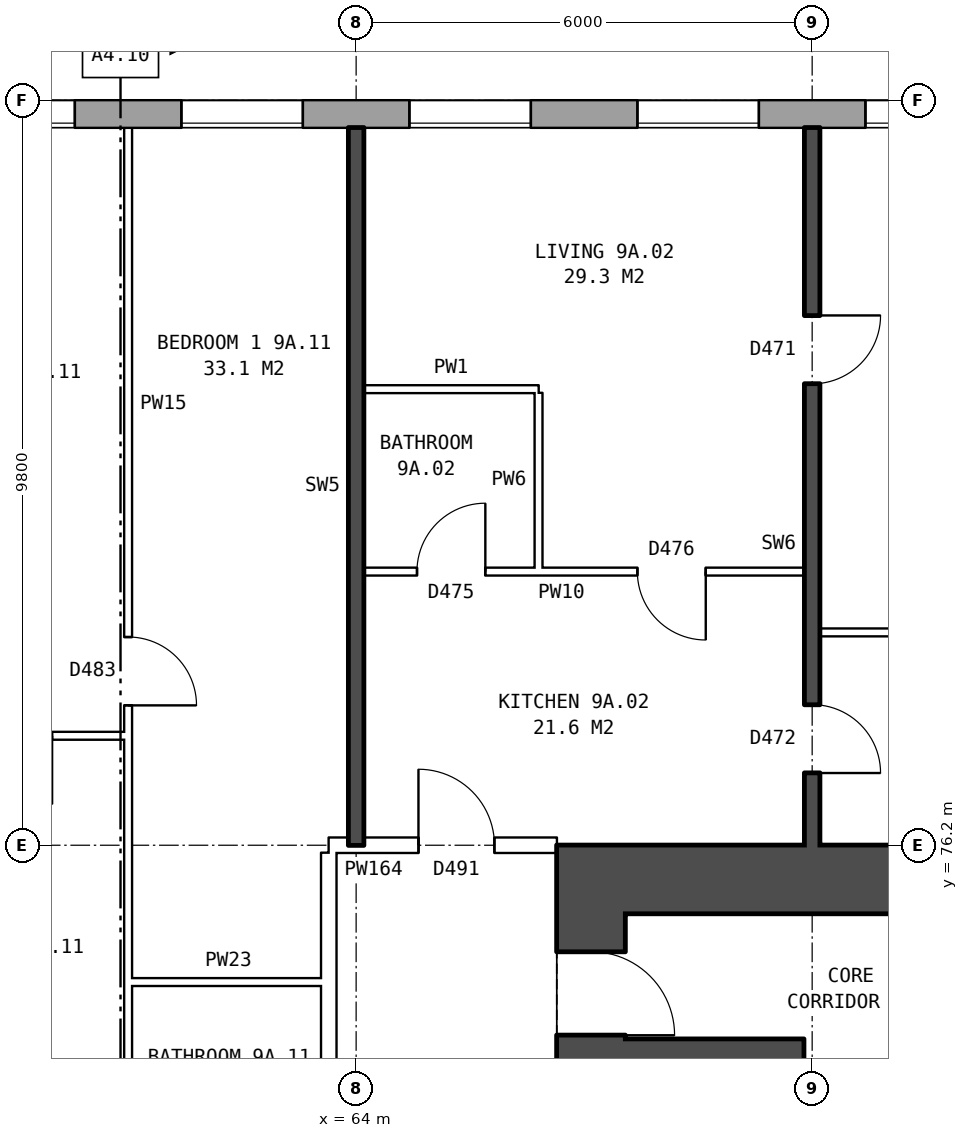
"""IFC4 building model, lengths in metres.
Left out: names, types, materials, properties, quantities, classifications, styles, units other than length and angle.
Written with IfcOpenShell. Run it as: python <this file> out.ifc"""

import sys

from ifc_helpers import new_model, si_unit, direction, frame, frame_2d, origin, place, context, subcontext, project, spatial, rectangle, extrude, element, fill, save


model = new_model("IFC4")
c1 = context("Model", 3, precision=1e-05, world=origin(), true_north=direction((0.0, 1.0)))
c2 = subcontext(c1, "Body", "Model", "MODEL_VIEW")
j1 = project(units=[si_unit("LENGTHUNIT", "METRE"), si_unit("PLANEANGLEUNIT", "RADIAN")], contexts=[c1])
p1 = place(None, origin())
s1 = spatial("IfcSite", under=j1, at=p1, CompositionType="ELEMENT")
p2 = place(p1, origin())
s2 = spatial("IfcBuilding", under=s1, at=p2, CompositionType="ELEMENT")
p3 = place(p2, frame((0.0, 0.0, 35.0)))
s3 = spatial("IfcBuildingStorey", under=s2, at=p3, CompositionType="ELEMENT", Elevation=35.0)
p4 = place(p3, frame((72.925, 85.82, 0.0), z_axis=(0.0, 0.0, 1.0), x_axis=(-1.0, 0.0, 0.0)))
e1 = element("IfcWall", 1, at=p4, inside=s3, PredefinedType="STANDARD", context=c2, shape_type="SweptSolid", body=[
    extrude(rectangle(XDim=50.101, YDim=0.36, at=frame_2d((25.05, 0.0))), origin(), (0.0, 0.0, 1.0), 2.85),
])
p5 = place(p4, frame((0.625, 0.0, 0.8)))
e2 = element("IfcOpeningElement", 2, at=p5, cuts=e1, PredefinedType="OPENING", context=c2, shape_type="SweptSolid", body=[
    extrude(rectangle(XDim=1.6, YDim=1.8, at=frame_2d((0.8, 0.9))), frame((0.0, 0.19, 0.0), z_axis=(0.0, -1.0, 0.0), x_axis=(1.0, 0.0, 0.0)), (0.0, 0.0, 1.0), 0.38),
])
p6 = place(p4, frame((3.625, 0.0, 0.8)))
e3 = element("IfcOpeningElement", 3, at=p6, cuts=e1, PredefinedType="OPENING", context=c2, shape_type="SweptSolid", body=[
    extrude(rectangle(XDim=1.6, YDim=1.8, at=frame_2d((0.8, 0.9))), frame((0.0, 0.19, 0.0), z_axis=(0.0, -1.0, 0.0), x_axis=(1.0, 0.0, 0.0)), (0.0, 0.0, 1.0), 0.38),
])
p7 = place(p4, frame((6.625, 0.0, 0.8)))
e4 = element("IfcOpeningElement", 4, at=p7, cuts=e1, PredefinedType="OPENING", context=c2, shape_type="SweptSolid", body=[
    extrude(rectangle(XDim=1.6, YDim=1.8, at=frame_2d((0.8, 0.9))), frame((0.0, 0.19, 0.0), z_axis=(0.0, -1.0, 0.0), x_axis=(1.0, 0.0, 0.0)), (0.0, 0.0, 1.0), 0.38),
])
p8 = place(p4, frame((9.625, 0.0, 0.8)))
e5 = element("IfcOpeningElement", 5, at=p8, cuts=e1, PredefinedType="OPENING", context=c2, shape_type="SweptSolid", body=[
    extrude(rectangle(XDim=1.6, YDim=1.8, at=frame_2d((0.8, 0.9))), frame((0.0, 0.19, 0.0), z_axis=(0.0, -1.0, 0.0), x_axis=(1.0, 0.0, 0.0)), (0.0, 0.0, 1.0), 0.38),
])
p9 = place(p4, frame((12.625, 0.0, 0.8)))
e6 = element("IfcOpeningElement", 6, at=p9, cuts=e1, PredefinedType="OPENING", context=c2, shape_type="SweptSolid", body=[
    extrude(rectangle(XDim=1.6, YDim=1.8, at=frame_2d((0.8, 0.9))), frame((0.0, 0.19, 0.0), z_axis=(0.0, -1.0, 0.0), x_axis=(1.0, 0.0, 0.0)), (0.0, 0.0, 1.0), 0.38),
])
p10 = place(p4, frame((15.625, 0.0, 0.8)))
e7 = element("IfcOpeningElement", 7, at=p10, cuts=e1, PredefinedType="OPENING", context=c2, shape_type="SweptSolid", body=[
    extrude(rectangle(XDim=1.6, YDim=1.8, at=frame_2d((0.8, 0.9))), frame((0.0, 0.19, 0.0), z_axis=(0.0, -1.0, 0.0), x_axis=(1.0, 0.0, 0.0)), (0.0, 0.0, 1.0), 0.38),
])
p11 = place(p4, frame((18.625, 0.0, 0.8)))
e8 = element("IfcOpeningElement", 8, at=p11, cuts=e1, PredefinedType="OPENING", context=c2, shape_type="SweptSolid", body=[
    extrude(rectangle(XDim=1.6, YDim=1.8, at=frame_2d((0.8, 0.9))), frame((0.0, 0.19, 0.0), z_axis=(0.0, -1.0, 0.0), x_axis=(1.0, 0.0, 0.0)), (0.0, 0.0, 1.0), 0.38),
])
p12 = place(p4, frame((21.125, 0.0, 1.1)))
e9 = element("IfcOpeningElement", 9, at=p12, cuts=e1, PredefinedType="OPENING", context=c2, shape_type="SweptSolid", body=[
    extrude(rectangle(XDim=0.8, YDim=1.5, at=frame_2d((0.4, 0.75))), frame((0.0, 0.19, 0.0), z_axis=(0.0, -1.0, 0.0), x_axis=(1.0, 0.0, 0.0)), (0.0, 0.0, 1.0), 0.38),
])
p13 = place(p4, frame((24.175, 0.0, 0.15)))
e10 = element("IfcOpeningElement", 10, at=p13, cuts=e1, PredefinedType="OPENING", context=c2, shape_type="SweptSolid", body=[
    extrude(rectangle(XDim=1.6, YDim=1.5, at=frame_2d((0.8, 0.75))), frame((0.0, 0.19, 0.0), z_axis=(0.0, -1.0, 0.0), x_axis=(1.0, 0.0, 0.0)), (0.0, 0.0, 1.0), 0.38),
])
p14 = place(p4, frame((27.275, 0.0, 1.7)))
e11 = element("IfcOpeningElement", 11, at=p14, cuts=e1, PredefinedType="OPENING", context=c2, shape_type="SweptSolid", body=[
    extrude(rectangle(XDim=1.2, YDim=0.9, at=frame_2d((0.6, 0.45))), frame((0.0, 0.19, 0.0), z_axis=(0.0, -1.0, 0.0), x_axis=(1.0, 0.0, 0.0)), (0.0, 0.0, 1.0), 0.38),
])
p15 = place(p4, frame((30.625, 0.0, 0.8)))
e12 = element("IfcOpeningElement", 12, at=p15, cuts=e1, PredefinedType="OPENING", context=c2, shape_type="SweptSolid", body=[
    extrude(rectangle(XDim=1.6, YDim=1.8, at=frame_2d((0.8, 0.9))), frame((0.0, 0.19, 0.0), z_axis=(0.0, -1.0, 0.0), x_axis=(1.0, 0.0, 0.0)), (0.0, 0.0, 1.0), 0.38),
])
p16 = place(p4, frame((33.625, 0.0, 0.8)))
e13 = element("IfcOpeningElement", 13, at=p16, cuts=e1, PredefinedType="OPENING", context=c2, shape_type="SweptSolid", body=[
    extrude(rectangle(XDim=1.6, YDim=1.8, at=frame_2d((0.8, 0.9))), frame((0.0, 0.19, 0.0), z_axis=(0.0, -1.0, 0.0), x_axis=(1.0, 0.0, 0.0)), (0.0, 0.0, 1.0), 0.38),
])
p17 = place(p4, frame((36.625, 0.0, 0.8)))
e14 = element("IfcOpeningElement", 14, at=p17, cuts=e1, PredefinedType="OPENING", context=c2, shape_type="SweptSolid", body=[
    extrude(rectangle(XDim=1.6, YDim=1.8, at=frame_2d((0.8, 0.9))), frame((0.0, 0.19, 0.0), z_axis=(0.0, -1.0, 0.0), x_axis=(1.0, 0.0, 0.0)), (0.0, 0.0, 1.0), 0.38),
])
p18 = place(p4, frame((39.625, 0.0, 0.8)))
e15 = element("IfcOpeningElement", 15, at=p18, cuts=e1, PredefinedType="OPENING", context=c2, shape_type="SweptSolid", body=[
    extrude(rectangle(XDim=1.6, YDim=1.8, at=frame_2d((0.8, 0.9))), frame((0.0, 0.19, 0.0), z_axis=(0.0, -1.0, 0.0), x_axis=(1.0, 0.0, 0.0)), (0.0, 0.0, 1.0), 0.38),
])
p19 = place(p4, frame((42.625, 0.0, 0.8)))
e16 = element("IfcOpeningElement", 16, at=p19, cuts=e1, PredefinedType="OPENING", context=c2, shape_type="SweptSolid", body=[
    extrude(rectangle(XDim=1.6, YDim=1.8, at=frame_2d((0.8, 0.9))), frame((0.0, 0.19, 0.0), z_axis=(0.0, -1.0, 0.0), x_axis=(1.0, 0.0, 0.0)), (0.0, 0.0, 1.0), 0.38),
])
p20 = place(p4, frame((45.625, 0.0, 0.8)))
e17 = element("IfcOpeningElement", 17, at=p20, cuts=e1, PredefinedType="OPENING", context=c2, shape_type="SweptSolid", body=[
    extrude(rectangle(XDim=1.6, YDim=1.8, at=frame_2d((0.8, 0.9))), frame((0.0, 0.19, 0.0), z_axis=(0.0, -1.0, 0.0), x_axis=(1.0, 0.0, 0.0)), (0.0, 0.0, 1.0), 0.38),
])
p21 = place(p4, frame((22.225, 0.0, 1.7)))
e18 = element("IfcOpeningElement", 18, at=p21, cuts=e1, PredefinedType="OPENING", context=c2, shape_type="SweptSolid", body=[
    extrude(rectangle(XDim=0.6, YDim=0.9, at=frame_2d((0.3, 0.45))), frame((0.0, 0.19, 0.0), z_axis=(0.0, -1.0, 0.0), x_axis=(1.0, 0.0, 0.0)), (0.0, 0.0, 1.0), 0.38),
])
p22 = place(p4, frame((26.075, 0.0, 0.25)))
e19 = element("IfcOpeningElement", 19, at=p22, cuts=e1, PredefinedType="OPENING", context=c2, shape_type="SweptSolid", body=[
    extrude(rectangle(XDim=0.6, YDim=0.9, at=frame_2d((0.3, 0.45))), frame((0.0, 0.19, 0.0), z_axis=(0.0, -1.0, 0.0), x_axis=(1.0, 0.0, 0.0)), (0.0, 0.0, 1.0), 0.38),
])
p23 = place(p4, frame((28.775, 0.0, 0.8)))
e20 = element("IfcOpeningElement", 20, at=p23, cuts=e1, PredefinedType="OPENING", context=c2, shape_type="SweptSolid", body=[
    extrude(rectangle(XDim=1.4, YDim=1.8, at=frame_2d((0.7, 0.9))), frame((0.0, 0.19, 0.0), z_axis=(0.0, -1.0, 0.0), x_axis=(1.0, 0.0, 0.0)), (0.0, 0.0, 1.0), 0.38),
])
p24 = place(p3, frame((67.09, 64.7, 0.0), z_axis=(0.0, 0.0, 1.0), x_axis=(0.0, 1.0, 0.0)))
e21 = element("IfcWall", 21, at=p24, inside=s3, PredefinedType="SHEAR", context=c2, shape_type="SweptSolid", body=[
    extrude(rectangle(XDim=10.6, YDim=0.9, at=frame_2d((5.3, 0.0))), origin(), (0.0, 0.0, 1.0), 2.85),
])
p25 = place(p24, frame((0.425, 0.0, 0.0)))
e22 = element("IfcOpeningElement", 22, at=p25, cuts=e21, PredefinedType="OPENING", context=c2, shape_type="SweptSolid", body=[
    extrude(rectangle(XDim=1.1, YDim=2.1, at=frame_2d((0.55, 1.05))), frame((0.0, 0.46, 0.0), z_axis=(0.0, -1.0, 0.0), x_axis=(1.0, 0.0, 0.0)), (0.0, 0.0, 1.0), 0.92),
])
p26 = place(p24, frame((9.0, 0.0, 0.0)))
e23 = element("IfcOpeningElement", 23, at=p26, cuts=e21, PredefinedType="OPENING", context=c2, shape_type="SweptSolid", body=[
    extrude(rectangle(XDim=1.1, YDim=2.1, at=frame_2d((0.55, 1.05))), frame((0.0, 0.46, 0.0), z_axis=(0.0, -1.0, 0.0), x_axis=(1.0, 0.0, 0.0)), (0.0, 0.0, 1.0), 0.92),
])
p27 = place(p3, frame((66.64, 75.75, 0.0), z_axis=(0.0, 0.0, 1.0), x_axis=(1.0, 0.0, 0.0)))
e24 = element("IfcWall", 24, at=p27, inside=s3, PredefinedType="SHEAR", context=c2, shape_type="SweptSolid", body=[
    extrude(rectangle(XDim=9.0, YDim=0.9, at=frame_2d((4.5, 0.0))), origin(), (0.0, 0.0, 1.0), 2.85),
])
p28 = place(p3, frame((67.54, 73.45, 0.0), z_axis=(0.0, 0.0, 1.0), x_axis=(1.0, 0.0, 0.0)))
e25 = element("IfcWall", 25, at=p28, inside=s3, PredefinedType="SHEAR", context=c2, shape_type="SweptSolid", body=[
    extrude(rectangle(XDim=1.95, YDim=0.4, at=frame_2d((0.975, 0.0))), origin(), (0.0, 0.0, 1.0), 2.85),
])
p29 = place(p3, frame((69.69, 67.05, 0.0), z_axis=(0.0, 0.0, 1.0), x_axis=(0.0, 1.0, 0.0)))
e26 = element("IfcWall", 26, at=p29, inside=s3, PredefinedType="SHEAR", context=c2, shape_type="SweptSolid", body=[
    extrude(rectangle(XDim=6.6, YDim=0.4, at=frame_2d((3.3, 0.0))), origin(), (0.0, 0.0, 1.0), 2.85),
])
p30 = place(p3, frame((63.64, 63.9, 0.0), z_axis=(0.0, 0.0, 1.0), x_axis=(0.0, 1.0, 0.0)))
e27 = element("IfcWall", 27, at=p30, inside=s3, PredefinedType="PARTITIONING", context=c2, shape_type="SweptSolid", body=[
    extrude(rectangle(XDim=12.2, YDim=0.2, at=frame_2d((6.1, 0.0))), origin(), (0.0, 0.0, 1.0), 2.85),
])
p31 = place(p30, frame((5.1, 0.0, 0.0)))
e28 = element("IfcOpeningElement", 28, at=p31, cuts=e27, PredefinedType="OPENING", context=c2, shape_type="SweptSolid", body=[
    extrude(rectangle(XDim=2.0, YDim=2.1, at=frame_2d((1.0, 1.05))), frame((0.0, 0.11, 0.0), z_axis=(0.0, -1.0, 0.0), x_axis=(1.0, 0.0, 0.0)), (0.0, 0.0, 1.0), 0.22),
])
p32 = place(p3, frame((61.0, 74.4, 0.0), z_axis=(0.0, 0.0, 1.0), x_axis=(1.0, 0.0, 0.0)))
e29 = element("IfcWall", 29, at=p32, inside=s3, PredefinedType="PARTITIONING", context=c2, shape_type="SweptSolid", body=[
    extrude(rectangle(XDim=2.64, YDim=0.1, at=frame_2d((1.32, 0.0))), origin(), (0.0, 0.0, 1.0), 2.85),
])
p33 = place(p3, frame((63.64, 76.2, 0.0), z_axis=(0.0, 0.0, 1.0), x_axis=(1.0, 0.0, 0.0)))
e30 = element("IfcWall", 30, at=p33, inside=s3, PredefinedType="PARTITIONING", context=c2, shape_type="SweptSolid", body=[
    extrude(rectangle(XDim=3.0, YDim=0.2, at=frame_2d((1.5, 0.0))), origin(), (0.0, 0.0, 1.0), 2.85),
])
p34 = place(p33, frame((1.18, 0.0, 0.0)))
e31 = element("IfcOpeningElement", 31, at=p34, cuts=e30, PredefinedType="OPENING", context=c2, shape_type="SweptSolid", body=[
    extrude(rectangle(XDim=1.0, YDim=2.1, at=frame_2d((0.5, 1.05))), frame((0.0, 0.11, 0.0), z_axis=(0.0, -1.0, 0.0), x_axis=(1.0, 0.0, 0.0)), (0.0, 0.0, 1.0), 0.22),
])
p35 = place(p3, frame((58.1, 77.64, 0.0), z_axis=(0.0, 0.0, 1.0), x_axis=(1.0, 0.0, 0.0)))
e32 = element("IfcWall", 32, at=p35, inside=s3, PredefinedType="PARTITIONING", context=c2, shape_type="SweptSolid", body=[
    extrude(rectangle(XDim=2.9, YDim=0.1, at=frame_2d((1.45, 0.0))), origin(), (0.0, 0.0, 1.0), 2.85),
])
p36 = place(p35, frame((1.0, 0.0, 0.0)))
e33 = element("IfcOpeningElement", 33, at=p36, cuts=e32, PredefinedType="OPENING", context=c2, shape_type="SweptSolid", body=[
    extrude(rectangle(XDim=0.9, YDim=2.1, at=frame_2d((0.45, 1.05))), frame((0.0, 0.06, 0.0), z_axis=(0.0, -1.0, 0.0), x_axis=(1.0, 0.0, 0.0)), (0.0, 0.0, 1.0), 0.12),
])
p37 = place(p3, frame((70.1, 79.0, 0.0), z_axis=(0.0, 0.0, 1.0), x_axis=(1.0, 0.0, 0.0)))
e34 = element("IfcWall", 34, at=p37, inside=s3, PredefinedType="PARTITIONING", context=c2, shape_type="SweptSolid", body=[
    extrude(rectangle(XDim=5.54, YDim=0.1, at=frame_2d((2.77, 0.0))), origin(), (0.0, 0.0, 1.0), 2.85),
])
p38 = place(p3, frame((64.1, 79.8, 0.0), z_axis=(0.0, 0.0, 1.0), x_axis=(1.0, 0.0, 0.0)))
e35 = element("IfcWall", 35, at=p38, inside=s3, PredefinedType="PARTITIONING", context=c2, shape_type="SweptSolid", body=[
    extrude(rectangle(XDim=5.8, YDim=0.1, at=frame_2d((2.9, 0.0))), origin(), (0.0, 0.0, 1.0), 2.85),
])
p39 = place(p38, frame((3.6, 0.0, 0.0)))
e36 = element("IfcOpeningElement", 36, at=p39, cuts=e35, PredefinedType="OPENING", context=c2, shape_type="SweptSolid", body=[
    extrude(rectangle(XDim=0.9, YDim=2.1, at=frame_2d((0.45, 1.05))), frame((0.0, 0.06, 0.0), z_axis=(0.0, -1.0, 0.0), x_axis=(1.0, 0.0, 0.0)), (0.0, 0.0, 1.0), 0.12),
])
p40 = place(p38, frame((0.7, 0.0, 0.0)))
e37 = element("IfcOpeningElement", 37, at=p40, cuts=e35, PredefinedType="OPENING", context=c2, shape_type="SweptSolid", body=[
    extrude(rectangle(XDim=0.9, YDim=2.1, at=frame_2d((0.45, 1.05))), frame((0.0, 0.06, 0.0), z_axis=(0.0, -1.0, 0.0), x_axis=(1.0, 0.0, 0.0)), (0.0, 0.0, 1.0), 0.12),
])
p41 = place(p3, frame((64.1, 82.2, 0.0), z_axis=(0.0, 0.0, 1.0), x_axis=(1.0, 0.0, 0.0)))
e38 = element("IfcWall", 38, at=p41, inside=s3, PredefinedType="PARTITIONING", context=c2, shape_type="SweptSolid", body=[
    extrude(rectangle(XDim=2.3, YDim=0.1, at=frame_2d((1.15, 0.0))), origin(), (0.0, 0.0, 1.0), 2.85),
])
p42 = place(p3, frame((61.0, 71.3, 0.0), z_axis=(0.0, 0.0, 1.0), x_axis=(0.0, 1.0, 0.0)))
e39 = element("IfcWall", 39, at=p42, inside=s3, PredefinedType="PARTITIONING", context=c2, shape_type="SweptSolid", body=[
    extrude(rectangle(XDim=14.34, YDim=0.1, at=frame_2d((7.17, 0.0))), origin(), (0.0, 0.0, 1.0), 2.85),
])
p43 = place(p42, frame((6.74, 0.0, 0.0)))
e40 = element("IfcOpeningElement", 40, at=p43, cuts=e39, PredefinedType="OPENING", context=c2, shape_type="SweptSolid", body=[
    extrude(rectangle(XDim=0.9, YDim=2.1, at=frame_2d((0.45, 1.05))), frame((0.0, 0.06, 0.0), z_axis=(0.0, -1.0, 0.0), x_axis=(1.0, 0.0, 0.0)), (0.0, 0.0, 1.0), 0.12),
])
p44 = place(p42, frame((0.4, 0.0, 0.0)))
e41 = element("IfcOpeningElement", 41, at=p44, cuts=e39, PredefinedType="OPENING", context=c2, shape_type="SweptSolid", body=[
    extrude(rectangle(XDim=0.9, YDim=2.1, at=frame_2d((0.45, 1.05))), frame((0.0, 0.06, 0.0), z_axis=(0.0, -1.0, 0.0), x_axis=(1.0, 0.0, 0.0)), (0.0, 0.0, 1.0), 0.12),
])
p45 = place(p3, frame((64.0, 76.2, 0.0), z_axis=(0.0, 0.0, 1.0), x_axis=(0.0, 1.0, 0.0)))
e42 = element("IfcWall", 42, at=p45, inside=s3, PredefinedType="SOLIDWALL", context=c2, shape_type="SweptSolid", body=[
    extrude(rectangle(XDim=9.44, YDim=0.2, at=frame_2d((4.72, 0.0))), origin(), (0.0, 0.0, 1.0), 2.85),
])
p46 = place(p3, frame((66.4, 79.85, 0.0), z_axis=(0.0, 0.0, 1.0), x_axis=(0.0, 1.0, 0.0)))
e43 = element("IfcWall", 43, at=p46, inside=s3, PredefinedType="PARTITIONING", context=c2, shape_type="SweptSolid", body=[
    extrude(rectangle(XDim=2.3, YDim=0.1, at=frame_2d((1.15, 0.0))), origin(), (0.0, 0.0, 1.0), 2.85),
])
p47 = place(p3, frame((70.0, 76.2, 0.0), z_axis=(0.0, 0.0, 1.0), x_axis=(0.0, 1.0, 0.0)))
e44 = element("IfcWall", 44, at=p47, inside=s3, PredefinedType="SOLIDWALL", context=c2, shape_type="SweptSolid", body=[
    extrude(rectangle(XDim=9.44, YDim=0.2, at=frame_2d((4.72, 0.0))), origin(), (0.0, 0.0, 1.0), 2.85),
])
p48 = place(p47, frame((6.07, 0.0, 0.0)))
e45 = element("IfcOpeningElement", 45, at=p48, cuts=e44, PredefinedType="OPENING", context=c2, shape_type="SweptSolid", body=[
    extrude(rectangle(XDim=0.9, YDim=2.1, at=frame_2d((0.45, 1.05))), frame((0.0, 0.11, 0.0), z_axis=(0.0, -1.0, 0.0), x_axis=(1.0, 0.0, 0.0)), (0.0, 0.0, 1.0), 0.22),
])
p49 = place(p47, frame((0.95, 0.0, 0.0)))
e46 = element("IfcOpeningElement", 46, at=p49, cuts=e44, PredefinedType="OPENING", context=c2, shape_type="SweptSolid", body=[
    extrude(rectangle(XDim=0.9, YDim=2.1, at=frame_2d((0.45, 1.05))), frame((0.0, 0.11, 0.0), z_axis=(0.0, -1.0, 0.0), x_axis=(1.0, 0.0, 0.0)), (0.0, 0.0, 1.0), 0.22),
])
p50 = place(p5, origin())
e47 = element("IfcWindow", 47, at=p50, inside=s3, PartitioningType="SINGLE_PANEL", PredefinedType="WINDOW", context=c2, shape_type="SweptSolid", body=[
    extrude(rectangle(XDim=1.6, YDim=1.8, at=frame_2d((0.8, 0.9))), frame((0.0, 0.15, 0.0), z_axis=(0.0, -1.0, 0.0), x_axis=(1.0, 0.0, 0.0)), (0.0, 0.0, 1.0), 0.06),
])
fill(e2, e47)
p51 = place(p6, origin())
e48 = element("IfcWindow", 48, at=p51, inside=s3, PartitioningType="SINGLE_PANEL", PredefinedType="WINDOW", context=c2, shape_type="SweptSolid", body=[
    extrude(rectangle(XDim=1.6, YDim=1.8, at=frame_2d((0.8, 0.9))), frame((0.0, 0.15, 0.0), z_axis=(0.0, -1.0, 0.0), x_axis=(1.0, 0.0, 0.0)), (0.0, 0.0, 1.0), 0.06),
])
fill(e3, e48)
p52 = place(p7, origin())
e49 = element("IfcWindow", 49, at=p52, inside=s3, PartitioningType="SINGLE_PANEL", PredefinedType="WINDOW", context=c2, shape_type="SweptSolid", body=[
    extrude(rectangle(XDim=1.6, YDim=1.8, at=frame_2d((0.8, 0.9))), frame((0.0, 0.15, 0.0), z_axis=(0.0, -1.0, 0.0), x_axis=(1.0, 0.0, 0.0)), (0.0, 0.0, 1.0), 0.06),
])
fill(e4, e49)
p53 = place(p8, origin())
e50 = element("IfcWindow", 50, at=p53, inside=s3, PartitioningType="SINGLE_PANEL", PredefinedType="WINDOW", context=c2, shape_type="SweptSolid", body=[
    extrude(rectangle(XDim=1.6, YDim=1.8, at=frame_2d((0.8, 0.9))), frame((0.0, 0.15, 0.0), z_axis=(0.0, -1.0, 0.0), x_axis=(1.0, 0.0, 0.0)), (0.0, 0.0, 1.0), 0.06),
])
fill(e5, e50)
p54 = place(p9, origin())
e51 = element("IfcWindow", 51, at=p54, inside=s3, PartitioningType="SINGLE_PANEL", PredefinedType="WINDOW", context=c2, shape_type="SweptSolid", body=[
    extrude(rectangle(XDim=1.6, YDim=1.8, at=frame_2d((0.8, 0.9))), frame((0.0, 0.15, 0.0), z_axis=(0.0, -1.0, 0.0), x_axis=(1.0, 0.0, 0.0)), (0.0, 0.0, 1.0), 0.06),
])
fill(e6, e51)
p55 = place(p26, frame((1.1, 0.0, 0.0), z_axis=(0.0, 0.0, 1.0), x_axis=(-1.0, 0.0, 0.0)))
e52 = element("IfcDoor", 52, at=p55, inside=s3, OperationType="SINGLE_SWING_RIGHT", PredefinedType="DOOR", context=c2, shape_type="SweptSolid", body=[
    extrude(rectangle(XDim=1.1, YDim=2.1, at=frame_2d((0.55, 1.05))), frame((0.0, 0.435, 0.0), z_axis=(0.0, -1.0, 0.0), x_axis=(1.0, 0.0, 0.0)), (0.0, 0.0, 1.0), 0.05),
])
fill(e23, e52)
p56 = place(p48, frame((0.9, 0.0, 0.0), z_axis=(0.0, 0.0, 1.0), x_axis=(-1.0, 0.0, 0.0)))
e53 = element("IfcDoor", 53, at=p56, inside=s3, OperationType="SINGLE_SWING_LEFT", PredefinedType="DOOR", context=c2, shape_type="SweptSolid", body=[
    extrude(rectangle(XDim=0.9, YDim=2.1, at=frame_2d((0.45, 1.05))), frame((0.0, 0.025, 0.0), z_axis=(0.0, -1.0, 0.0), x_axis=(1.0, 0.0, 0.0)), (0.0, 0.0, 1.0), 0.05),
])
fill(e45, e53)
p57 = place(p49, frame((0.9, 0.0, 0.0), z_axis=(0.0, 0.0, 1.0), x_axis=(-1.0, 0.0, 0.0)))
e54 = element("IfcDoor", 54, at=p57, inside=s3, OperationType="SINGLE_SWING_RIGHT", PredefinedType="DOOR", context=c2, shape_type="SweptSolid", body=[
    extrude(rectangle(XDim=0.9, YDim=2.1, at=frame_2d((0.45, 1.05))), frame((0.0, 0.025, 0.0), z_axis=(0.0, -1.0, 0.0), x_axis=(1.0, 0.0, 0.0)), (0.0, 0.0, 1.0), 0.05),
])
fill(e46, e54)
p58 = place(p34, origin())
e55 = element("IfcDoor", 55, at=p58, inside=s3, OperationType="SINGLE_SWING_LEFT", PredefinedType="DOOR", context=c2, shape_type="SweptSolid", body=[
    extrude(rectangle(XDim=1.0, YDim=2.1, at=frame_2d((0.5, 1.05))), frame((0.0, 0.025, 0.0), z_axis=(0.0, -1.0, 0.0), x_axis=(1.0, 0.0, 0.0)), (0.0, 0.0, 1.0), 0.05),
])
fill(e31, e55)
p59 = place(p39, frame((0.9, 0.0, 0.0), z_axis=(0.0, 0.0, 1.0), x_axis=(-1.0, 0.0, 0.0)))
e56 = element("IfcDoor", 56, at=p59, inside=s3, OperationType="SINGLE_SWING_LEFT", PredefinedType="DOOR", context=c2, shape_type="SweptSolid", body=[
    extrude(rectangle(XDim=0.9, YDim=2.1, at=frame_2d((0.45, 1.05))), frame((0.0, 0.025, 0.0), z_axis=(0.0, -1.0, 0.0), x_axis=(1.0, 0.0, 0.0)), (0.0, 0.0, 1.0), 0.05),
])
fill(e36, e56)
p60 = place(p40, origin())
e57 = element("IfcDoor", 57, at=p60, inside=s3, OperationType="SINGLE_SWING_RIGHT", PredefinedType="DOOR", context=c2, shape_type="SweptSolid", body=[
    extrude(rectangle(XDim=0.9, YDim=2.1, at=frame_2d((0.45, 1.05))), frame((0.0, 0.025, 0.0), z_axis=(0.0, -1.0, 0.0), x_axis=(1.0, 0.0, 0.0)), (0.0, 0.0, 1.0), 0.05),
])
fill(e37, e57)
p61 = place(p43, frame((0.9, 0.0, 0.0), z_axis=(0.0, 0.0, 1.0), x_axis=(-1.0, 0.0, 0.0)))
e58 = element("IfcDoor", 58, at=p61, inside=s3, OperationType="SINGLE_SWING_RIGHT", PredefinedType="DOOR", context=c2, shape_type="SweptSolid", body=[
    extrude(rectangle(XDim=0.9, YDim=2.1, at=frame_2d((0.45, 1.05))), frame((0.0, 0.025, 0.0), z_axis=(0.0, -1.0, 0.0), x_axis=(1.0, 0.0, 0.0)), (0.0, 0.0, 1.0), 0.05),
])
fill(e40, e58)
save(model, sys.argv[1])
